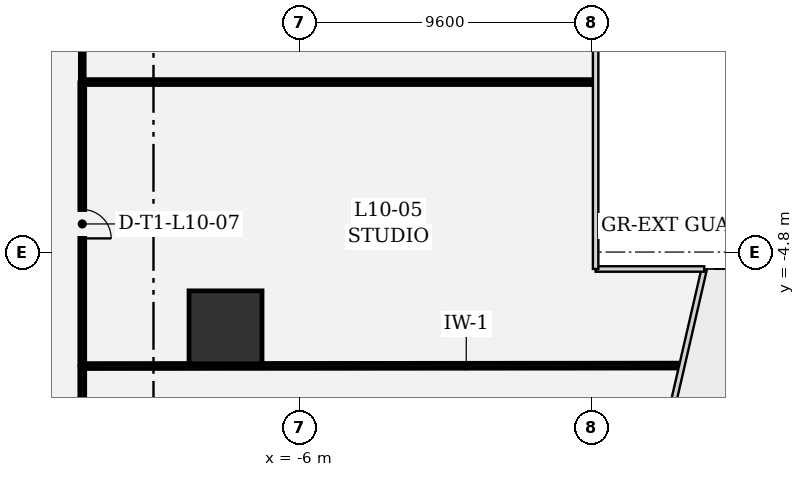
"""IFC4 building model, lengths in metres.
Left out: names, types, materials, properties, quantities, classifications, styles, units other than length and angle.
Written with IfcOpenShell. Run it as: python <this file> out.ifc"""

import sys

from ifc_helpers import new_model, si_unit, direction, frame, frame_2d, origin, origin_2d, place, context, subcontext, project, spatial, rectangle, extrude, element, fill, save


model = new_model("IFC4")
c1 = context("Model", 3, precision=1e-05, world=origin(), true_north=direction((0.0, 1.0)))
c2 = subcontext(c1, "Body", "Model", "MODEL_VIEW")
j1 = project(units=[si_unit("LENGTHUNIT", "METRE"), si_unit("PLANEANGLEUNIT", "RADIAN")], contexts=[c1])
p1 = place(None, origin())
s1 = spatial("IfcSite", under=j1, at=p1, CompositionType="ELEMENT")
p2 = place(p1, origin())
s2 = spatial("IfcBuilding", under=s1, at=p2, CompositionType="ELEMENT")
p3 = place(p2, frame((0.0, 0.0, 49.2)))
s3 = spatial("IfcBuildingStorey", under=s2, at=p3, CompositionType="ELEMENT", Elevation=49.2)
p4 = place(p3, frame((-8.43, -7.276, 0.0), z_axis=(0.0, 0.0, 1.0), x_axis=(1.0, 0.0, 0.0)))
e1 = element("IfcColumn", 1, at=p4, inside=s3, PredefinedType="COLUMN", context=c2, shape_type="SweptSolid", body=[
    extrude(rectangle(XDim=2.4, YDim=2.4, at=origin_2d()), origin(), (0.0, 0.0, 1.0), 4.2),
])
p5 = place(p3, frame((6.502, -8.535, 0.0), z_axis=(0.0, 0.0, 1.0), x_axis=(-0.999999692694, -0.000783971885, 0.0)))
e2 = element("IfcWall", 2, at=p5, inside=s3, PredefinedType="PARTITIONING", context=c2, shape_type="SweptSolid", body=[
    extrude(rectangle(XDim=19.619, YDim=0.16, at=frame_2d((9.81, 0.0))), origin(), (0.0, 0.0, 1.0), 2.957),
])
p6 = place(p3, frame((-13.142, -8.575, 0.0), z_axis=(0.0, 0.0, 1.0), x_axis=(0.0, -1.0, 0.0)))
e3 = element("IfcWall", 3, at=p6, inside=s3, PredefinedType="PARTITIONING", context=c2, shape_type="SweptSolid", body=[
    extrude(rectangle(XDim=2.358, YDim=0.16, at=frame_2d((1.179, 0.0))), origin(), (0.0, 0.0, 1.0), 3.92),
])
p7 = place(p3, frame((3.663, 0.791, 0.0), z_axis=(0.0, 0.0, 1.0), x_axis=(-1.0, 0.0, 0.0)))
e4 = element("IfcWall", 4, at=p7, inside=s3, PredefinedType="PARTITIONING", context=c2, shape_type="SweptSolid", body=[
    extrude(rectangle(XDim=16.78, YDim=0.16, at=frame_2d((8.39, 0.0))), origin(), (0.0, 0.0, 1.0), 3.92),
])
p8 = place(p3, frame((-13.142, 0.766, 0.0), z_axis=(0.0, 0.0, 1.0), x_axis=(0.0, -1.0, 0.0)))
e5 = element("IfcWall", 5, at=p8, inside=s3, PredefinedType="PARTITIONING", context=c2, shape_type="SweptSolid", body=[
    extrude(rectangle(XDim=9.283, YDim=0.16, at=frame_2d((4.642, 0.0))), origin(), (0.0, 0.0, 1.0), 3.92),
])
p9 = place(p8, frame((4.167, 0.0, 0.0)))
e6 = element("IfcOpeningElement", 6, at=p9, cuts=e5, PredefinedType="OPENING", context=c2, shape_type="SweptSolid", body=[
    extrude(rectangle(XDim=0.95, YDim=2.15, at=frame_2d((0.475, 1.075))), frame((0.0, 0.09, 0.0), z_axis=(0.0, -1.0, 0.0), x_axis=(1.0, 0.0, 0.0)), (0.0, 0.0, 1.0), 0.18),
])
p10 = place(p3, frame((-13.142, 8.317, 0.0), z_axis=(0.0, 0.0, 1.0), x_axis=(0.0, -1.0, 0.0)))
e7 = element("IfcWall", 7, at=p10, inside=s3, PredefinedType="PARTITIONING", context=c2, shape_type="SweptSolid", body=[
    extrude(rectangle(XDim=7.493, YDim=0.125, at=frame_2d((3.746, 0.0))), origin(), (0.0, 0.0, 1.0), 3.92),
])
p11 = place(p10, frame((3.271, 0.0, 0.0)))
e8 = element("IfcOpeningElement", 8, at=p11, cuts=e7, PredefinedType="OPENING", context=c2, shape_type="SweptSolid", body=[
    extrude(rectangle(XDim=0.95, YDim=2.15, at=frame_2d((0.475, 1.075))), frame((0.0, 0.073, 0.0), z_axis=(0.0, -1.0, 0.0), x_axis=(1.0, 0.0, 0.0)), (0.0, 0.0, 1.0), 0.145),
])
p12 = place(p9, origin())
e9 = element("IfcDoor", 9, at=p12, inside=s3, OperationType="SINGLE_SWING_RIGHT", PredefinedType="DOOR", context=c2, shape_type="SweptSolid", body=[
    extrude(rectangle(XDim=0.95, YDim=2.15, at=frame_2d((0.475, 1.075))), frame((0.0, 0.025, 0.0), z_axis=(0.0, -1.0, 0.0), x_axis=(1.0, 0.0, 0.0)), (0.0, 0.0, 1.0), 0.05),
])
fill(e6, e9)
save(model, sys.argv[1])
